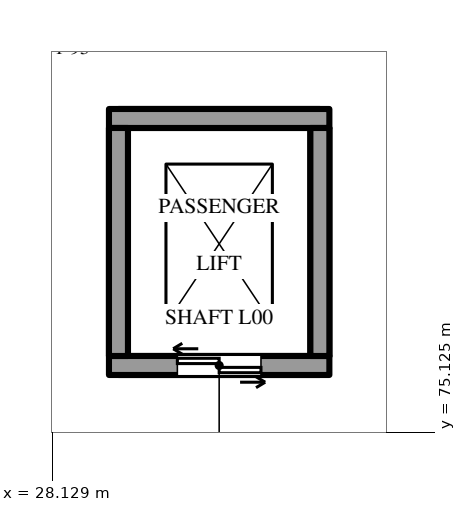
"""IFC4 building model, lengths in metres.
Left out: names, types, materials, properties, quantities, classifications, styles, units other than length and angle.
Written with IfcOpenShell. Run it as: python <this file> out.ifc"""

import sys

from ifc_helpers import new_model, si_unit, direction, frame, frame_2d, origin, place, context, subcontext, project, spatial, rectangle, extrude, element, fill, save


model = new_model("IFC4")
c1 = context("Model", 3, precision=1e-05, world=origin(), true_north=direction((0.0, 1.0)))
c2 = subcontext(c1, "Body", "Model", "MODEL_VIEW")
j1 = project(units=[si_unit("LENGTHUNIT", "METRE"), si_unit("PLANEANGLEUNIT", "RADIAN")], contexts=[c1])
p1 = place(None, origin())
s1 = spatial("IfcSite", under=j1, at=p1, CompositionType="ELEMENT")
p2 = place(p1, origin())
s2 = spatial("IfcBuilding", under=s1, at=p2, CompositionType="ELEMENT")
p3 = place(p2, origin())
s3 = spatial("IfcBuildingStorey", under=s2, at=p3, CompositionType="ELEMENT", Elevation=0.0)
p4 = place(p3, frame((29.0, 76.0, 0.0), z_axis=(0.0, 0.0, 1.0), x_axis=(1.0, 0.0, 0.0)))
e1 = element("IfcWall", 1, at=p4, inside=s3, PredefinedType="SOLIDWALL", context=c2, shape_type="SweptSolid", body=[
    extrude(rectangle(XDim=2.65, YDim=0.25, at=frame_2d((1.325, 0.0))), origin(), (0.0, 0.0, 1.0), 6.85),
])
p5 = place(p4, frame((0.775, 0.0, 0.0)))
e2 = element("IfcOpeningElement", 2, at=p5, cuts=e1, PredefinedType="OPENING", context=c2, shape_type="SweptSolid", body=[
    extrude(rectangle(XDim=1.1, YDim=2.1, at=frame_2d((0.55, 1.05))), frame((0.0, 0.135, 0.0), z_axis=(0.0, -1.0, 0.0), x_axis=(1.0, 0.0, 0.0)), (0.0, 0.0, 1.0), 0.27),
])
p6 = place(p3, frame((29.0, 79.25, 0.0), z_axis=(0.0, 0.0, 1.0), x_axis=(1.0, 0.0, 0.0)))
e3 = element("IfcWall", 3, at=p6, inside=s3, PredefinedType="SOLIDWALL", context=c2, shape_type="SweptSolid", body=[
    extrude(rectangle(XDim=2.65, YDim=0.25, at=frame_2d((1.325, 0.0))), origin(), (0.0, 0.0, 1.0), 6.85),
])
for number, where, z_axis, x_axis in (
    (4, (29.0, 76.125, 0.0), (0.0, 0.0, 1.0), (0.0, 1.0, 0.0)),
    (5, (31.65, 76.125, 0.0), (0.0, 0.0, 1.0), (0.0, 1.0, 0.0)),
):
    element("IfcWall", number, at=place(p3, frame(where, z_axis=z_axis, x_axis=x_axis)), inside=s3, PredefinedType="SOLIDWALL", context=c2, shape_type="SweptSolid", body=[
        extrude(rectangle(XDim=3.0, YDim=0.25, at=frame_2d((1.5, 0.0))), origin(), (0.0, 0.0, 1.0), 6.85),
    ])
for number, where, z_axis, x_axis in (
    (6, (28.875, 76.0, -1.4), (0.0, 0.0, 1.0), (1.0, 0.0, 0.0)),
    (7, (28.875, 79.25, -1.4), (0.0, 0.0, 1.0), (1.0, 0.0, 0.0)),
):
    element("IfcWall", number, at=place(p3, frame(where, z_axis=z_axis, x_axis=x_axis)), inside=s3, PredefinedType="SOLIDWALL", context=c2, shape_type="SweptSolid", body=[
        extrude(rectangle(XDim=2.9, YDim=0.25, at=frame_2d((1.45, 0.0))), origin(), (0.0, 0.0, 1.0), 1.1),
    ])
for number, where, z_axis, x_axis in (
    (8, (29.0, 76.125, -1.4), (0.0, 0.0, 1.0), (0.0, 1.0, 0.0)),
    (9, (31.65, 76.125, -1.4), (0.0, 0.0, 1.0), (0.0, 1.0, 0.0)),
):
    element("IfcWall", number, at=place(p3, frame(where, z_axis=z_axis, x_axis=x_axis)), inside=s3, PredefinedType="SOLIDWALL", context=c2, shape_type="SweptSolid", body=[
        extrude(rectangle(XDim=3.0, YDim=0.25, at=frame_2d((1.5, 0.0))), origin(), (0.0, 0.0, 1.0), 1.1),
    ])
p7 = place(p5, origin())
e10 = element("IfcDoor", 10, at=p7, inside=s3, OperationType="DOUBLE_DOOR_SLIDING", PredefinedType="DOOR", context=c2, shape_type="SweptSolid", body=[
    extrude(rectangle(XDim=1.1, YDim=2.1, at=frame_2d((0.55, 1.05))), frame((0.0, 0.025, 0.0), z_axis=(0.0, -1.0, 0.0), x_axis=(1.0, 0.0, 0.0)), (0.0, 0.0, 1.0), 0.05),
])
fill(e2, e10)
save(model, sys.argv[1])
